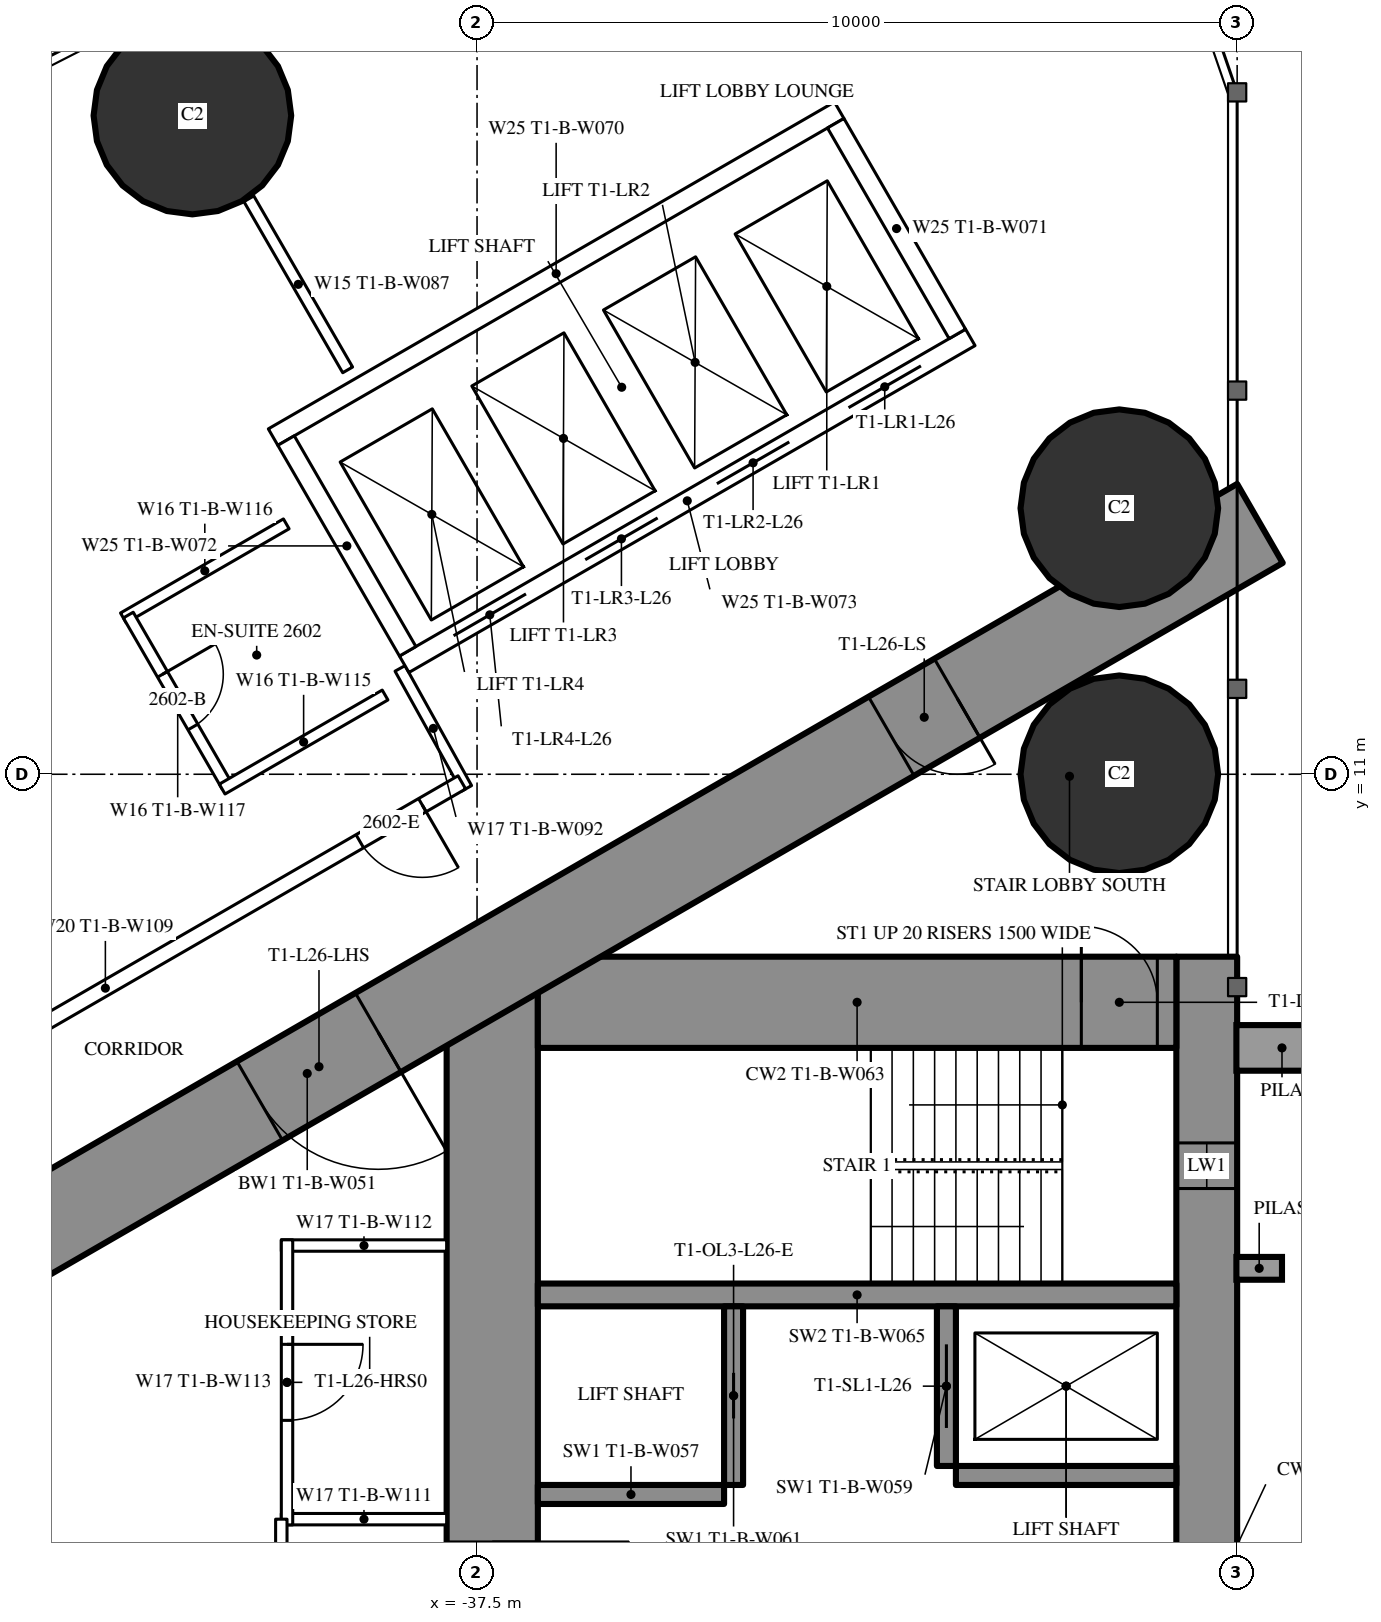
"""IFC4 building model, lengths in metres.
Left out: names, types, materials, properties, quantities, classifications, styles, units other than length and angle.
Written with IfcOpenShell. Run it as: python <this file> out.ifc"""

import sys

from ifc_helpers import new_model, si_unit, direction, frame, frame_2d, origin, origin_2d, place, context, subcontext, project, spatial, rectangle, hollow_circle, extrude, element, fill, save


model = new_model("IFC4")
c1 = context("Model", 3, precision=1e-05, world=origin(), true_north=direction((0.0, 1.0)))
c2 = subcontext(c1, "Body", "Model", "MODEL_VIEW")
j1 = project(units=[si_unit("LENGTHUNIT", "METRE"), si_unit("PLANEANGLEUNIT", "RADIAN")], contexts=[c1])
p1 = place(None, origin())
s1 = spatial("IfcSite", under=j1, at=p1, CompositionType="ELEMENT")
p2 = place(p1, origin())
s2 = spatial("IfcBuilding", under=s1, at=p2, CompositionType="ELEMENT")
p3 = place(p2, frame((0.0, 0.0, 101.1)))
s3 = spatial("IfcBuildingStorey", under=s2, at=p3, CompositionType="ELEMENT", Elevation=101.1)
for number, where, z_axis, x_axis in (
    (1, (-29.05, 11.0, 0.0), (0.0, 0.0, 1.0), (1.0, 0.0, 0.0)),
    (2, (-29.05, 14.5, 0.0), (0.0, 0.0, 1.0), (1.0, 0.0, 0.0)),
    (3, (-41.245, 19.666, 0.0), (0.0, 0.0, 1.0), (1.0, 0.0, 0.0)),
):
    element("IfcColumn", number, at=place(p3, frame(where, z_axis=z_axis, x_axis=x_axis)), inside=s3, PredefinedType="COLUMN", context=c2, shape_type="SweptSolid", body=[
        extrude(hollow_circle(Radius=1.3, WallThickness=0.1, at=origin_2d()), origin(), (0.0, 0.0, 1.0), 3.5),
    ])
p4 = place(p3, frame((-27.9, 8.6, 0.0), z_axis=(0.0, 0.0, 1.0), x_axis=(0.0, -1.0, 0.0)))
e4 = element("IfcWall", 4, at=p4, inside=s3, PredefinedType="SHEAR", context=c2, shape_type="SweptSolid", body=[
    extrude(rectangle(XDim=17.2, YDim=0.8, at=frame_2d((8.6, 0.0))), origin(), (0.0, 0.0, 1.0), 3.5),
])
p5 = place(p4, frame((2.45, 0.0, 0.6)))
e5 = element("IfcOpeningElement", 5, at=p5, cuts=e4, PredefinedType="OPENING", context=c2, shape_type="SweptSolid", body=[
    extrude(rectangle(XDim=0.6, YDim=2.1, at=frame_2d((0.3, 1.05))), frame((0.0, 0.41, 0.0), z_axis=(0.0, -1.0, 0.0), x_axis=(1.0, 0.0, 0.0)), (0.0, 0.0, 1.0), 0.82),
])
p6 = place(p4, frame((14.15, 0.0, 0.6)))
e6 = element("IfcOpeningElement", 6, at=p6, cuts=e4, PredefinedType="OPENING", context=c2, shape_type="SweptSolid", body=[
    extrude(rectangle(XDim=0.6, YDim=2.1, at=frame_2d((0.3, 1.05))), frame((0.0, 0.41, 0.0), z_axis=(0.0, -1.0, 0.0), x_axis=(1.0, 0.0, 0.0)), (0.0, 0.0, 1.0), 0.82),
])
p7 = place(p3, frame((-37.3, 8.6, 0.0), z_axis=(0.0, 0.0, 1.0), x_axis=(0.0, -1.0, 0.0)))
e7 = element("IfcWall", 7, at=p7, inside=s3, PredefinedType="SHEAR", context=c2, shape_type="SweptSolid", body=[
    extrude(rectangle(XDim=17.2, YDim=1.2, at=frame_2d((8.6, 0.0))), origin(), (0.0, 0.0, 1.0), 3.5),
])
p8 = place(p7, frame((7.7, 0.0, 0.0)))
e8 = element("IfcOpeningElement", 8, at=p8, cuts=e7, PredefinedType="OPENING", context=c2, shape_type="SweptSolid", body=[
    extrude(rectangle(XDim=1.8, YDim=2.2, at=frame_2d((0.9, 1.1))), frame((0.0, 0.61, 0.0), z_axis=(0.0, -1.0, 0.0), x_axis=(1.0, 0.0, 0.0)), (0.0, 0.0, 1.0), 1.22),
])
p9 = place(p3, frame((-28.3, 8.0, 0.0), z_axis=(0.0, 0.0, 1.0), x_axis=(-1.0, 0.0, 0.0)))
e9 = element("IfcWall", 9, at=p9, inside=s3, PredefinedType="SHEAR", context=c2, shape_type="SweptSolid", body=[
    extrude(rectangle(XDim=8.4, YDim=1.2, at=frame_2d((4.2, 0.0))), origin(), (0.0, 0.0, 1.0), 3.5),
])
p10 = place(p9, frame((0.25, 0.0, 0.0)))
e10 = element("IfcOpeningElement", 10, at=p10, cuts=e9, PredefinedType="OPENING", context=c2, shape_type="SweptSolid", body=[
    extrude(rectangle(XDim=1.0, YDim=2.2, at=frame_2d((0.5, 1.1))), frame((0.0, 0.61, 0.0), z_axis=(0.0, -1.0, 0.0), x_axis=(1.0, 0.0, 0.0)), (0.0, 0.0, 1.0), 1.22),
])
p11 = place(p3, frame((-28.3, 4.15, 0.0), z_axis=(0.0, 0.0, 1.0), x_axis=(-1.0, 0.0, 0.0)))
e11 = element("IfcWall", 11, at=p11, inside=s3, PredefinedType="SHEAR", context=c2, shape_type="SweptSolid", body=[
    extrude(rectangle(XDim=8.4, YDim=0.3, at=frame_2d((4.2, 0.0))), origin(), (0.0, 0.0, 1.0), 3.5),
])
p12 = place(p3, frame((-31.325, 4.0, 0.0), z_axis=(0.0, 0.0, 1.0), x_axis=(0.0, -1.0, 0.0)))
e12 = element("IfcWall", 12, at=p12, inside=s3, PredefinedType="SHEAR", context=c2, shape_type="SweptSolid", body=[
    extrude(rectangle(XDim=2.1, YDim=0.25, at=frame_2d((1.05, 0.0))), origin(), (0.0, 0.0, 1.0), 3.5),
])
p13 = place(p12, frame((0.5, 0.0, 0.0)))
e13 = element("IfcOpeningElement", 13, at=p13, cuts=e12, PredefinedType="OPENING", context=c2, shape_type="SweptSolid", body=[
    extrude(rectangle(XDim=1.1, YDim=2.2, at=frame_2d((0.55, 1.1))), frame((0.0, 0.135, 0.0), z_axis=(0.0, -1.0, 0.0), x_axis=(1.0, 0.0, 0.0)), (0.0, 0.0, 1.0), 0.27),
])
p14 = place(p3, frame((-34.125, 4.0, 0.0), z_axis=(0.0, 0.0, 1.0), x_axis=(0.0, -1.0, 0.0)))
e14 = element("IfcWall", 14, at=p14, inside=s3, PredefinedType="SHEAR", context=c2, shape_type="SweptSolid", body=[
    extrude(rectangle(XDim=2.35, YDim=0.25, at=frame_2d((1.175, 0.0))), origin(), (0.0, 0.0, 1.0), 3.5),
])
p15 = place(p14, frame((0.875, 0.0, 0.0)))
e15 = element("IfcOpeningElement", 15, at=p15, cuts=e14, PredefinedType="OPENING", context=c2, shape_type="SweptSolid", body=[
    extrude(rectangle(XDim=0.6, YDim=2.0, at=frame_2d((0.3, 1.0))), frame((0.0, 0.135, 0.0), z_axis=(0.0, -1.0, 0.0), x_axis=(1.0, 0.0, 0.0)), (0.0, 0.0, 1.0), 0.27),
])
p16 = place(p3, frame((-28.3, 1.775, 0.0), z_axis=(0.0, 0.0, 1.0), x_axis=(-1.0, 0.0, 0.0)))
e16 = element("IfcWall", 16, at=p16, inside=s3, PredefinedType="SHEAR", context=c2, shape_type="SweptSolid", body=[
    extrude(rectangle(XDim=2.9, YDim=0.25, at=frame_2d((1.45, 0.0))), origin(), (0.0, 0.0, 1.0), 3.5),
])
p17 = place(p3, frame((-34.25, 1.525, 0.0), z_axis=(0.0, 0.0, 1.0), x_axis=(-1.0, 0.0, 0.0)))
e17 = element("IfcWall", 17, at=p17, inside=s3, PredefinedType="SHEAR", context=c2, shape_type="SweptSolid", body=[
    extrude(rectangle(XDim=2.45, YDim=0.25, at=frame_2d((1.225, 0.0))), origin(), (0.0, 0.0, 1.0), 3.5),
])
p18 = place(p3, frame((-27.2, 14.3, 0.0), z_axis=(0.0, 0.0, 1.0), x_axis=(-0.866026593062, -0.499997940104, 0.0)))
e18 = element("IfcWall", 18, at=p18, inside=s3, PredefinedType="SHEAR", context=c2, shape_type="SweptSolid", body=[
    extrude(rectangle(XDim=28.946, YDim=1.2, at=frame_2d((14.473, 0.0))), origin(), (0.0, 0.0, 1.0), 3.5),
])
p19 = place(p18, frame((4.6, 0.0, 0.0)))
e19 = element("IfcOpeningElement", 19, at=p19, cuts=e18, PredefinedType="OPENING", context=c2, shape_type="SweptSolid", body=[
    extrude(rectangle(XDim=1.0, YDim=2.2, at=frame_2d((0.5, 1.1))), frame((0.0, 0.61, 0.0), z_axis=(0.0, -1.0, 0.0), x_axis=(1.0, 0.0, 0.0)), (0.0, 0.0, 1.0), 1.22),
])
p20 = place(p18, frame((13.395, 0.0, 0.0)))
e20 = element("IfcOpeningElement", 20, at=p20, cuts=e18, PredefinedType="OPENING", context=c2, shape_type="SweptSolid", body=[
    extrude(rectangle(XDim=1.8, YDim=2.2, at=frame_2d((0.9, 1.1))), frame((0.0, 0.61, 0.0), z_axis=(0.0, -1.0, 0.0), x_axis=(1.0, 0.0, 0.0)), (0.0, 0.0, 1.0), 1.22),
])
p21 = place(p3, frame((-39.202, 16.32, 0.0), z_axis=(0.0, 0.0, 1.0), x_axis=(-0.499947391036, 0.866055775454, 0.0)))
e21 = element("IfcWall", 21, at=p21, inside=s3, PredefinedType="PARTITIONING", context=c2, shape_type="SweptSolid", body=[
    extrude(rectangle(XDim=2.599, YDim=0.15, at=frame_2d((1.3, 0.0))), origin(), (0.0, 0.0, 1.0), 3.25),
])
p22 = place(p3, frame((-38.513, 12.392, 0.0), z_axis=(0.0, 0.0, 1.0), x_axis=(0.485585508183, -0.874189175317, 0.0)))
e22 = element("IfcWall", 22, at=p22, inside=s3, PredefinedType="PARTITIONING", context=c2, shape_type="SweptSolid", body=[
    extrude(rectangle(XDim=1.805, YDim=0.15, at=frame_2d((0.902, 0.0))), origin(), (0.0, 0.0, 1.0), 3.25),
])
p23 = place(p3, frame((-37.7, 10.894, 0.0), z_axis=(0.0, 0.0, 1.0), x_axis=(-0.866027551079, -0.499996280759, 0.0)))
e23 = element("IfcWall", 23, at=p23, inside=s3, PredefinedType="PARTITIONING", context=c2, shape_type="SweptSolid", body=[
    extrude(rectangle(XDim=10.831, YDim=0.2, at=frame_2d((5.415, 0.0))), origin(), (0.0, 0.0, 1.0), 3.25),
])
p24 = place(p23, frame((0.6, 0.0, 0.0)))
e24 = element("IfcOpeningElement", 24, at=p24, cuts=e23, PredefinedType="OPENING", context=c2, shape_type="SweptSolid", body=[
    extrude(rectangle(XDim=0.95, YDim=2.2, at=frame_2d((0.475, 1.1))), frame((0.0, 0.11, 0.0), z_axis=(0.0, -1.0, 0.0), x_axis=(1.0, 0.0, 0.0)), (0.0, 0.0, 1.0), 0.22),
])
p25 = place(p3, frame((-40.01, 14.294, 0.0), z_axis=(0.0, 0.0, 1.0), x_axis=(-0.866031185235, -0.4999899861, 0.0)))
e25 = element("IfcWall", 25, at=p25, inside=s3, PredefinedType="PARTITIONING", context=c2, shape_type="SweptSolid", body=[
    extrude(rectangle(XDim=2.475, YDim=0.15, at=frame_2d((1.238, 0.0))), origin(), (0.0, 0.0, 1.0), 3.25),
])
p26 = place(p3, frame((-40.788, 10.843, 0.0), z_axis=(0.0, 0.0, 1.0), x_axis=(-0.500006934395, 0.866021400173, 0.0)))
e26 = element("IfcWall", 26, at=p26, inside=s3, PredefinedType="PARTITIONING", context=c2, shape_type="SweptSolid", body=[
    extrude(rectangle(XDim=2.6, YDim=0.15, at=frame_2d((1.3, 0.0))), origin(), (0.0, 0.0, 1.0), 3.25),
])
p27 = place(p26, frame((0.9, 0.0, 0.0)))
e27 = element("IfcOpeningElement", 27, at=p27, cuts=e26, PredefinedType="OPENING", context=c2, shape_type="SweptSolid", body=[
    extrude(rectangle(XDim=0.8, YDim=2.2, at=frame_2d((0.4, 1.1))), frame((0.0, 0.085, 0.0), z_axis=(0.0, -1.0, 0.0), x_axis=(1.0, 0.0, 0.0)), (0.0, 0.0, 1.0), 0.17),
])
p28 = place(p3, frame((-38.71, 12.042, 0.0), z_axis=(0.0, 0.0, 1.0), x_axis=(-0.86604923931, -0.499958713387, 0.0)))
e28 = element("IfcWall", 28, at=p28, inside=s3, PredefinedType="PARTITIONING", context=c2, shape_type="SweptSolid", body=[
    extrude(rectangle(XDim=2.475, YDim=0.15, at=frame_2d((1.237, 0.0))), origin(), (0.0, 0.0, 1.0), 3.25),
])
for number, where, z_axis, x_axis in (
    (29, (-37.9, 1.2, 0.0), (0.0, 0.0, 1.0), (-1.0, 0.0, 0.0)),
    (30, (-37.9, 4.8, 0.0), (0.0, 0.0, 1.0), (-1.0, 0.0, 0.0)),
):
    element("IfcWall", number, at=place(p3, frame(where, z_axis=z_axis, x_axis=x_axis)), inside=s3, PredefinedType="PARTITIONING", context=c2, shape_type="SweptSolid", body=[
        extrude(rectangle(XDim=2.175, YDim=0.15, at=frame_2d((1.087, 0.0))), origin(), (0.0, 0.0, 1.0), 3.25),
    ])
p29 = place(p3, frame((-40.0, 4.875, 0.0), z_axis=(0.0, 0.0, 1.0), x_axis=(0.0, -1.0, 0.0)))
e31 = element("IfcWall", 31, at=p29, inside=s3, PredefinedType="PARTITIONING", context=c2, shape_type="SweptSolid", body=[
    extrude(rectangle(XDim=3.75, YDim=0.15, at=frame_2d((1.875, 0.0))), origin(), (0.0, 0.0, 1.0), 3.25),
])
p30 = place(p29, frame((1.375, 0.0, 0.0)))
e32 = element("IfcOpeningElement", 32, at=p30, cuts=e31, PredefinedType="OPENING", context=c2, shape_type="SweptSolid", body=[
    extrude(rectangle(XDim=1.0, YDim=2.2, at=frame_2d((0.5, 1.1))), frame((0.0, 0.085, 0.0), z_axis=(0.0, -1.0, 0.0), x_axis=(1.0, 0.0, 0.0)), (0.0, 0.0, 1.0), 0.17),
])
p31 = place(p3, frame((-40.075, 1.2, 0.0), z_axis=(0.0, 0.0, 1.0), x_axis=(0.0, -1.0, 0.0)))
e33 = element("IfcWall", 33, at=p31, inside=s3, PredefinedType="PARTITIONING", context=c2, shape_type="SweptSolid", body=[
    extrude(rectangle(XDim=7.374, YDim=0.15, at=frame_2d((3.687, 0.0))), origin(), (0.0, 0.0, 1.0), 3.25),
])
p32 = place(p31, frame((2.787, 0.0, 0.0)))
e34 = element("IfcOpeningElement", 34, at=p32, cuts=e33, PredefinedType="OPENING", context=c2, shape_type="SweptSolid", body=[
    extrude(rectangle(XDim=1.8, YDim=2.2, at=frame_2d((0.9, 1.1))), frame((0.0, 0.085, 0.0), z_axis=(0.0, -1.0, 0.0), x_axis=(1.0, 0.0, 0.0)), (0.0, 0.0, 1.0), 0.17),
])
p33 = place(p3, frame((-31.01, 16.747, 0.0), z_axis=(0.0, 0.0, 1.0), x_axis=(-0.866028165386, -0.499995216735, 0.0)))
e35 = element("IfcWall", 35, at=p33, inside=s3, PredefinedType="PARTITIONING", context=c2, shape_type="SweptSolid", body=[
    extrude(rectangle(XDim=8.6, YDim=0.25, at=frame_2d((4.3, 0.0))), origin(), (0.0, 0.0, 1.0), 3.25),
])
p34 = place(p33, frame((0.75, 0.0, 0.0)))
e36 = element("IfcOpeningElement", 36, at=p34, cuts=e35, PredefinedType="OPENING", context=c2, shape_type="SweptSolid", body=[
    extrude(rectangle(XDim=1.1, YDim=2.2, at=frame_2d((0.55, 1.1))), frame((0.0, 0.135, 0.0), z_axis=(0.0, -1.0, 0.0), x_axis=(1.0, 0.0, 0.0)), (0.0, 0.0, 1.0), 0.27),
])
p35 = place(p33, frame((2.75, 0.0, 0.0)))
e37 = element("IfcOpeningElement", 37, at=p35, cuts=e35, PredefinedType="OPENING", context=c2, shape_type="SweptSolid", body=[
    extrude(rectangle(XDim=1.1, YDim=2.2, at=frame_2d((0.55, 1.1))), frame((0.0, 0.135, 0.0), z_axis=(0.0, -1.0, 0.0), x_axis=(1.0, 0.0, 0.0)), (0.0, 0.0, 1.0), 0.27),
])
p36 = place(p33, frame((4.75, 0.0, 0.0)))
e38 = element("IfcOpeningElement", 38, at=p36, cuts=e35, PredefinedType="OPENING", context=c2, shape_type="SweptSolid", body=[
    extrude(rectangle(XDim=1.1, YDim=2.2, at=frame_2d((0.55, 1.1))), frame((0.0, 0.135, 0.0), z_axis=(0.0, -1.0, 0.0), x_axis=(1.0, 0.0, 0.0)), (0.0, 0.0, 1.0), 0.27),
])
p37 = place(p33, frame((6.75, 0.0, 0.0)))
e39 = element("IfcOpeningElement", 39, at=p37, cuts=e35, PredefinedType="OPENING", context=c2, shape_type="SweptSolid", body=[
    extrude(rectangle(XDim=1.1, YDim=2.2, at=frame_2d((0.55, 1.1))), frame((0.0, 0.135, 0.0), z_axis=(0.0, -1.0, 0.0), x_axis=(1.0, 0.0, 0.0)), (0.0, 0.0, 1.0), 0.27),
])
p38 = place(p3, frame((-32.736, 19.736, 0.0), z_axis=(0.0, 0.0, 1.0), x_axis=(-0.866028165386, -0.499995216735, 0.0)))
e40 = element("IfcWall", 40, at=p38, inside=s3, PredefinedType="PARTITIONING", context=c2, shape_type="SweptSolid", body=[
    extrude(rectangle(XDim=8.6, YDim=0.25, at=frame_2d((4.3, 0.0))), origin(), (0.0, 0.0, 1.0), 3.25),
])
p39 = place(p3, frame((-31.181, 16.793, 0.0), z_axis=(0.0, 0.0, 1.0), x_axis=(-0.499929347863, 0.866066190972, 0.0)))
e41 = element("IfcWall", 41, at=p39, inside=s3, PredefinedType="PARTITIONING", context=c2, shape_type="SweptSolid", body=[
    extrude(rectangle(XDim=3.201, YDim=0.25, at=frame_2d((1.6, 0.0))), origin(), (0.0, 0.0, 1.0), 3.25),
])
p40 = place(p3, frame((-38.413, 12.618, 0.0), z_axis=(0.0, 0.0, 1.0), x_axis=(-0.499872130319, 0.866099216793, 0.0)))
e42 = element("IfcWall", 42, at=p40, inside=s3, PredefinedType="PARTITIONING", context=c2, shape_type="SweptSolid", body=[
    extrude(rectangle(XDim=3.2, YDim=0.25, at=frame_2d((1.6, 0.0))), origin(), (0.0, 0.0, 1.0), 3.25),
])
p41 = place(p27, origin())
e43 = element("IfcDoor", 43, at=p41, inside=s3, OperationType="SINGLE_SWING_RIGHT", PredefinedType="DOOR", context=c2, shape_type="SweptSolid", body=[
    extrude(rectangle(XDim=0.8, YDim=2.2, at=frame_2d((0.4, 1.1))), frame((0.0, 0.025, 0.0), z_axis=(0.0, -1.0, 0.0), x_axis=(1.0, 0.0, 0.0)), (0.0, 0.0, 1.0), 0.05),
])
fill(e27, e43)
p42 = place(p24, origin())
e44 = element("IfcDoor", 44, at=p42, inside=s3, OperationType="SINGLE_SWING_LEFT", PredefinedType="DOOR", context=c2, shape_type="SweptSolid", body=[
    extrude(rectangle(XDim=0.95, YDim=2.2, at=frame_2d((0.475, 1.1))), frame((0.0, 0.025, 0.0), z_axis=(0.0, -1.0, 0.0), x_axis=(1.0, 0.0, 0.0)), (0.0, 0.0, 1.0), 0.05),
])
fill(e24, e44)
p43 = place(p30, origin())
e45 = element("IfcDoor", 45, at=p43, inside=s3, OperationType="SINGLE_SWING_LEFT", PredefinedType="DOOR", context=c2, shape_type="SweptSolid", body=[
    extrude(rectangle(XDim=1.0, YDim=2.2, at=frame_2d((0.5, 1.1))), frame((0.0, 0.025, 0.0), z_axis=(0.0, -1.0, 0.0), x_axis=(1.0, 0.0, 0.0)), (0.0, 0.0, 1.0), 0.05),
])
fill(e32, e45)
p44 = place(p19, origin())
e46 = element("IfcDoor", 46, at=p44, inside=s3, OperationType="SINGLE_SWING_LEFT", PredefinedType="DOOR", context=c2, shape_type="SweptSolid", body=[
    extrude(rectangle(XDim=1.0, YDim=2.2, at=frame_2d((0.5, 1.1))), frame((0.0, 0.025, 0.0), z_axis=(0.0, -1.0, 0.0), x_axis=(1.0, 0.0, 0.0)), (0.0, 0.0, 1.0), 0.05),
])
fill(e19, e46)
p45 = place(p20, origin())
e47 = element("IfcDoor", 47, at=p45, inside=s3, OperationType="DOUBLE_DOOR_SINGLE_SWING", PredefinedType="DOOR", context=c2, shape_type="SweptSolid", body=[
    extrude(rectangle(XDim=1.8, YDim=2.2, at=frame_2d((0.9, 1.1))), frame((0.0, 0.025, 0.0), z_axis=(0.0, -1.0, 0.0), x_axis=(1.0, 0.0, 0.0)), (0.0, 0.0, 1.0), 0.05),
])
fill(e20, e47)
p46 = place(p8, origin())
e48 = element("IfcDoor", 48, at=p46, inside=s3, OperationType="DOUBLE_DOOR_SINGLE_SWING", PredefinedType="DOOR", context=c2, shape_type="SweptSolid", body=[
    extrude(rectangle(XDim=1.8, YDim=2.2, at=frame_2d((0.9, 1.1))), frame((0.0, 0.025, 0.0), z_axis=(0.0, -1.0, 0.0), x_axis=(1.0, 0.0, 0.0)), (0.0, 0.0, 1.0), 0.05),
])
fill(e8, e48)
p47 = place(p10, origin())
e49 = element("IfcDoor", 49, at=p47, inside=s3, OperationType="SINGLE_SWING_RIGHT", PredefinedType="DOOR", context=c2, shape_type="SweptSolid", body=[
    extrude(rectangle(XDim=1.0, YDim=2.2, at=frame_2d((0.5, 1.1))), frame((0.0, 0.025, 0.0), z_axis=(0.0, -1.0, 0.0), x_axis=(1.0, 0.0, 0.0)), (0.0, 0.0, 1.0), 0.05),
])
fill(e10, e49)
p48 = place(p13, origin())
e50 = element("IfcDoor", 50, at=p48, inside=s3, OperationType="SLIDING_TO_LEFT", PredefinedType="USERDEFINED", context=c2, shape_type="SweptSolid", body=[
    extrude(rectangle(XDim=1.1, YDim=2.2, at=frame_2d((0.55, 1.1))), frame((0.0, 0.025, 0.0), z_axis=(0.0, -1.0, 0.0), x_axis=(1.0, 0.0, 0.0)), (0.0, 0.0, 1.0), 0.05),
])
fill(e13, e50)
p49 = place(p15, origin())
e51 = element("IfcDoor", 51, at=p49, inside=s3, OperationType="SLIDING_TO_LEFT", PredefinedType="DOOR", context=c2, shape_type="SweptSolid", body=[
    extrude(rectangle(XDim=0.6, YDim=2.0, at=frame_2d((0.3, 1.0))), frame((0.0, 0.025, 0.0), z_axis=(0.0, -1.0, 0.0), x_axis=(1.0, 0.0, 0.0)), (0.0, 0.0, 1.0), 0.05),
])
fill(e15, e51)
p50 = place(p34, origin())
e52 = element("IfcDoor", 52, at=p50, inside=s3, OperationType="DOUBLE_DOOR_SLIDING", PredefinedType="USERDEFINED", context=c2, shape_type="SweptSolid", body=[
    extrude(rectangle(XDim=1.1, YDim=2.2, at=frame_2d((0.55, 1.1))), frame((0.0, 0.025, 0.0), z_axis=(0.0, -1.0, 0.0), x_axis=(1.0, 0.0, 0.0)), (0.0, 0.0, 1.0), 0.05),
])
fill(e36, e52)
p51 = place(p35, origin())
e53 = element("IfcDoor", 53, at=p51, inside=s3, OperationType="DOUBLE_DOOR_SLIDING", PredefinedType="USERDEFINED", context=c2, shape_type="SweptSolid", body=[
    extrude(rectangle(XDim=1.1, YDim=2.2, at=frame_2d((0.55, 1.1))), frame((0.0, 0.025, 0.0), z_axis=(0.0, -1.0, 0.0), x_axis=(1.0, 0.0, 0.0)), (0.0, 0.0, 1.0), 0.05),
])
fill(e37, e53)
p52 = place(p36, origin())
e54 = element("IfcDoor", 54, at=p52, inside=s3, OperationType="DOUBLE_DOOR_SLIDING", PredefinedType="USERDEFINED", context=c2, shape_type="SweptSolid", body=[
    extrude(rectangle(XDim=1.1, YDim=2.2, at=frame_2d((0.55, 1.1))), frame((0.0, 0.025, 0.0), z_axis=(0.0, -1.0, 0.0), x_axis=(1.0, 0.0, 0.0)), (0.0, 0.0, 1.0), 0.05),
])
fill(e38, e54)
p53 = place(p37, origin())
e55 = element("IfcDoor", 55, at=p53, inside=s3, OperationType="DOUBLE_DOOR_SLIDING", PredefinedType="USERDEFINED", context=c2, shape_type="SweptSolid", body=[
    extrude(rectangle(XDim=1.1, YDim=2.2, at=frame_2d((0.55, 1.1))), frame((0.0, 0.025, 0.0), z_axis=(0.0, -1.0, 0.0), x_axis=(1.0, 0.0, 0.0)), (0.0, 0.0, 1.0), 0.05),
])
fill(e39, e55)
p54 = place(p5, origin())
e56 = element("IfcWindow", 56, at=p54, inside=s3, PartitioningType="SINGLE_PANEL", PredefinedType="WINDOW", context=c2, shape_type="SweptSolid", body=[
    extrude(rectangle(XDim=0.6, YDim=2.1, at=frame_2d((0.3, 1.05))), frame((0.0, 0.03, 0.0), z_axis=(0.0, -1.0, 0.0), x_axis=(1.0, 0.0, 0.0)), (0.0, 0.0, 1.0), 0.06),
])
fill(e5, e56)
save(model, sys.argv[1])
